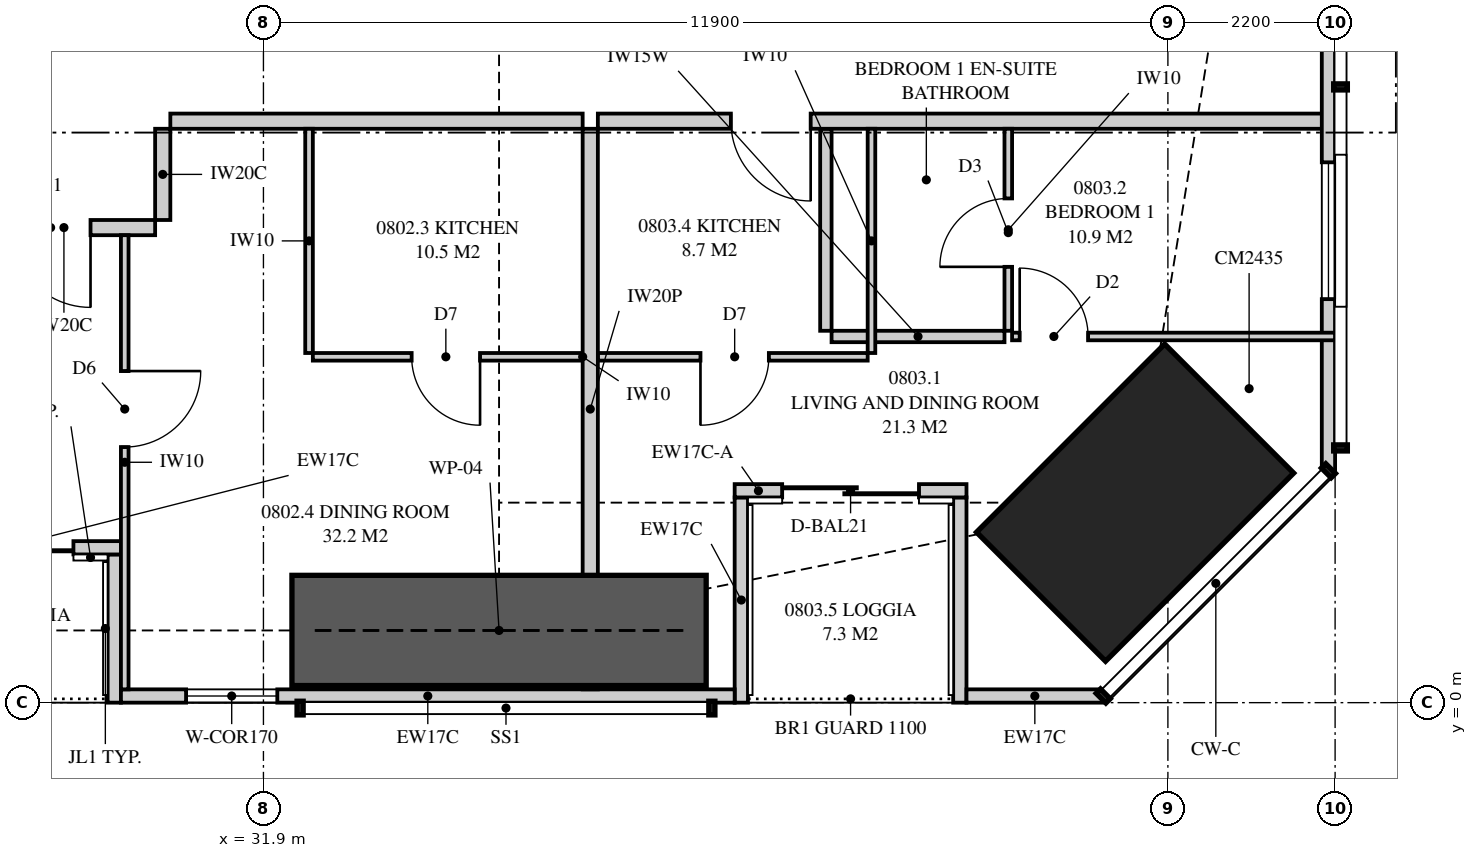
"""IFC4 building model, lengths in metres.
Left out: names, types, materials, properties, quantities, classifications, styles, units other than length and angle.
Written with IfcOpenShell. Run it as: python <this file> out.ifc"""

import sys

from ifc_helpers import new_model, si_unit, direction, frame, frame_2d, origin, origin_2d, place, context, subcontext, project, spatial, polyline, rectangle, outline, extrude, element, fill, save


model = new_model("IFC4")
c1 = context("Model", 3, precision=1e-05, world=origin(), true_north=direction((0.0, 1.0)))
c2 = subcontext(c1, "Body", "Model", "MODEL_VIEW")
j1 = project(units=[si_unit("LENGTHUNIT", "METRE"), si_unit("PLANEANGLEUNIT", "RADIAN")], contexts=[c1])
p1 = place(None, origin())
s1 = spatial("IfcSite", under=j1, at=p1, CompositionType="ELEMENT")
p2 = place(p1, origin())
s2 = spatial("IfcBuilding", under=s1, at=p2, CompositionType="ELEMENT")
p3 = place(p2, frame((0.0, 0.0, 34.4)))
s3 = spatial("IfcBuildingStorey", under=s2, at=p3, CompositionType="ELEMENT", Elevation=34.4)
p4 = place(p3, frame((43.369, 2.631, 0.0), z_axis=(0.0, 0.0, 1.0), x_axis=(-0.707106781187, 0.707106781187, 0.0)))
e1 = element("IfcColumn", 1, at=p4, inside=s3, PredefinedType="COLUMN", context=c2, shape_type="SweptSolid", body=[
    extrude(rectangle(XDim=2.4, YDim=3.5, at=origin_2d()), origin(), (0.0, 0.0, 1.0), 3.35),
])
p5 = place(p3, frame((30.025, 0.087, 0.0), z_axis=(0.0, 0.0, 1.0), x_axis=(1.0, 0.0, 0.0)))
e2 = element("IfcWall", 2, at=p5, inside=s3, PredefinedType="SOLIDWALL", context=c2, shape_type="SweptSolid", body=[
    extrude(outline(polyline([(0.0, 0.0), (8.075, 0.0), (8.075, 3.11), (5.179, 3.11), (5.179, 2.15), (5.131, 2.15), (5.131, 3.11), (4.975, 3.11), (4.975, 2.15), (0.0, 2.15), (0.0, 0.0)])), frame((0.0, 0.087, 0.0), z_axis=(0.0, -1.0, 0.0), x_axis=(1.0, 0.0, 0.0)), (0.0, 0.0, 1.0), 0.175),
])
p6 = place(p5, frame((0.857, 0.0, 0.4)))
e3 = element("IfcOpeningElement", 3, at=p6, cuts=e2, PredefinedType="OPENING", context=c2, shape_type="SweptSolid", body=[
    extrude(rectangle(XDim=1.2, YDim=1.7, at=frame_2d((0.6, 0.85))), frame((0.0, 0.097, 0.0), z_axis=(0.0, -1.0, 0.0), x_axis=(1.0, 0.0, 0.0)), (0.0, 0.0, 1.0), 0.195),
])
p7 = place(p3, frame((41.15, 0.087, 0.0), z_axis=(0.0, 0.0, 1.0), x_axis=(1.0, 0.0, 0.0)))
e4 = element("IfcWall", 4, at=p7, inside=s3, PredefinedType="SOLIDWALL", context=c2, shape_type="SweptSolid", body=[
    extrude(rectangle(XDim=1.799, YDim=0.175, at=frame_2d((0.899, 0.0))), origin(), (0.0, 0.0, 1.0), 3.11),
])
p8 = place(p3, frame((26.975, 2.038, 0.0), z_axis=(0.0, 0.0, 1.0), x_axis=(1.0, 0.0, 0.0)))
e5 = element("IfcWall", 5, at=p8, inside=s3, PredefinedType="SOLIDWALL", context=c2, shape_type="SweptSolid", body=[
    extrude(rectangle(XDim=3.05, YDim=0.175, at=frame_2d((1.525, 0.0))), origin(), (0.0, 0.0, 1.0), 3.11),
])
p9 = place(p8, frame((0.625, 0.0, 0.0)))
e6 = element("IfcOpeningElement", 6, at=p9, cuts=e5, PredefinedType="OPENING", context=c2, shape_type="SweptSolid", body=[
    extrude(rectangle(XDim=1.8, YDim=2.1, at=frame_2d((0.9, 1.05))), frame((0.0, 0.097, 0.0), z_axis=(0.0, -1.0, 0.0), x_axis=(1.0, 0.0, 0.0)), (0.0, 0.0, 1.0), 0.195),
])
p10 = place(p3, frame((29.938, 0.0, 0.0), z_axis=(0.0, 0.0, 1.0), x_axis=(0.0, 1.0, 0.0)))
e7 = element("IfcWall", 7, at=p10, inside=s3, PredefinedType="SOLIDWALL", context=c2, shape_type="SweptSolid", body=[
    extrude(outline(polyline([(0.0, 0.0), (1.95, 0.0), (1.95, 3.11), (1.75, 3.11), (1.75, 2.15), (0.15, 2.15), (0.15, 3.11), (0.0, 3.11), (0.0, 0.0)])), frame((0.0, 0.087, 0.0), z_axis=(0.0, -1.0, 0.0), x_axis=(1.0, 0.0, 0.0)), (0.0, 0.0, 1.0), 0.175),
])
p11 = place(p3, frame((38.1, 2.788, 0.0), z_axis=(0.0, 0.0, 1.0), x_axis=(1.0, 0.0, 0.0)))
e8 = element("IfcWall", 8, at=p11, inside=s3, PredefinedType="SOLIDWALL", context=c2, shape_type="SweptSolid", body=[
    extrude(rectangle(XDim=0.625, YDim=0.175, at=frame_2d((0.312, 0.0))), origin(), (0.0, 0.0, 1.0), 2.51),
])
p12 = place(p3, frame((38.725, 2.788, 0.0), z_axis=(0.0, 0.0, 1.0), x_axis=(1.0, 0.0, 0.0)))
e9 = element("IfcWall", 9, at=p12, inside=s3, PredefinedType="SOLIDWALL", context=c2, shape_type="SweptSolid", body=[
    extrude(rectangle(XDim=2.425, YDim=0.175, at=frame_2d((1.212, 0.0))), origin(), (0.0, 0.0, 1.0), 2.15),
])
p13 = place(p12, origin())
e10 = element("IfcOpeningElement", 10, at=p13, cuts=e9, PredefinedType="OPENING", context=c2, shape_type="SweptSolid", body=[
    extrude(rectangle(XDim=1.8, YDim=2.1, at=frame_2d((0.9, 1.05))), frame((0.0, 0.097, 0.0), z_axis=(0.0, -1.0, 0.0), x_axis=(1.0, 0.0, 0.0)), (0.0, 0.0, 1.0), 0.195),
])
p14 = place(p3, frame((38.188, 0.0, 0.0), z_axis=(0.0, 0.0, 1.0), x_axis=(0.0, 1.0, 0.0)))
e11 = element("IfcWall", 11, at=p14, inside=s3, PredefinedType="SOLIDWALL", context=c2, shape_type="SweptSolid", body=[
    extrude(outline(polyline([(0.0, 0.0), (2.7, 0.0), (2.7, 2.51), (2.424, 2.51), (2.424, 2.15), (0.757, 2.15), (0.757, 3.11), (0.0, 3.11), (0.0, 0.0)])), frame((0.0, 0.087, 0.0), z_axis=(0.0, -1.0, 0.0), x_axis=(1.0, 0.0, 0.0)), (0.0, 0.0, 1.0), 0.175),
])
p15 = place(p3, frame((41.062, 0.0, 0.0), z_axis=(0.0, 0.0, 1.0), x_axis=(0.0, 1.0, 0.0)))
e12 = element("IfcWall", 12, at=p15, inside=s3, PredefinedType="SOLIDWALL", context=c2, shape_type="SweptSolid", body=[
    extrude(outline(polyline([(0.0, 0.0), (2.7, 0.0), (2.7, 2.15), (1.334, 2.15), (1.334, 3.11), (0.0, 3.11), (0.0, 0.0)])), frame((0.0, 0.087, 0.0), z_axis=(0.0, -1.0, 0.0), x_axis=(1.0, 0.0, 0.0)), (0.0, 0.0, 1.0), 0.175),
])
p16 = place(p3, frame((45.913, 3.051, 0.0), z_axis=(0.0, 0.0, 1.0), x_axis=(0.0, 1.0, 0.0)))
e13 = element("IfcWall", 13, at=p16, inside=s3, PredefinedType="SOLIDWALL", context=c2, shape_type="SweptSolid", body=[
    extrude(outline(polyline([(0.0, 0.0), (31.897, 0.0), (31.897, 3.11), (22.167, 3.11), (22.167, 2.15), (22.074, 2.15), (22.074, 3.11), (21.949, 3.11), (21.949, 2.15), (9.949, 2.15), (9.949, 3.11), (9.823, 3.11), (9.823, 2.15), (9.73, 2.15), (9.73, 3.11), (0.0, 3.11), (0.0, 0.0)])), frame((0.0, 0.087, 0.0), z_axis=(0.0, -1.0, 0.0), x_axis=(1.0, 0.0, 0.0)), (0.0, 0.0, 1.0), 0.175),
])
p17 = place(p16, frame((2.257, 0.0, 0.4)))
e14 = element("IfcOpeningElement", 14, at=p17, cuts=e13, PredefinedType="OPENING", context=c2, shape_type="SweptSolid", body=[
    extrude(rectangle(XDim=1.8, YDim=1.7, at=frame_2d((0.9, 0.85))), frame((0.0, 0.097, 0.0), z_axis=(0.0, -1.0, 0.0), x_axis=(1.0, 0.0, 0.0)), (0.0, 0.0, 1.0), 0.195),
])
p18 = place(p16, frame((14.849, 0.0, 0.4)))
e15 = element("IfcOpeningElement", 15, at=p18, cuts=e13, PredefinedType="OPENING", context=c2, shape_type="SweptSolid", body=[
    extrude(rectangle(XDim=1.2, YDim=1.7, at=frame_2d((0.6, 0.85))), frame((0.0, 0.097, 0.0), z_axis=(0.0, -1.0, 0.0), x_axis=(1.0, 0.0, 0.0)), (0.0, 0.0, 1.0), 0.195),
])
p19 = place(p16, frame((27.34, 0.0, 0.4)))
e16 = element("IfcOpeningElement", 16, at=p19, cuts=e13, PredefinedType="OPENING", context=c2, shape_type="SweptSolid", body=[
    extrude(rectangle(XDim=1.8, YDim=1.7, at=frame_2d((0.9, 0.85))), frame((0.0, 0.097, 0.0), z_axis=(0.0, -1.0, 0.0), x_axis=(1.0, 0.0, 0.0)), (0.0, 0.0, 1.0), 0.195),
])
p20 = place(p3, frame((36.2, 0.175, 0.0), z_axis=(0.0, 0.0, 1.0), x_axis=(0.0, 1.0, 0.0)))
e17 = element("IfcWall", 17, at=p20, inside=s3, PredefinedType="PARTITIONING", context=c2, shape_type="SweptSolid", body=[
    extrude(outline(polyline([(0.088, 3.11), (0.0, 3.11), (0.0, 0.0), (0.529, 0.0), (0.529, 0.677), (1.021, 0.677), (1.021, 0.0), (7.375, 0.0), (7.375, 3.11), (3.766, 3.11), (3.766, 2.51), (1.944, 2.51), (1.944, 2.15), (1.021, 2.15), (1.021, 1.473), (0.529, 1.473), (0.529, 2.15), (0.088, 2.15), (0.088, 3.11)])), frame((0.0, 0.1, 0.0), z_axis=(0.0, -1.0, 0.0), x_axis=(1.0, 0.0, 0.0)), (0.0, 0.0, 1.0), 0.2),
])
p21 = place(p3, frame((32.55, 4.55, 0.0), z_axis=(0.0, 0.0, 1.0), x_axis=(1.0, 0.0, 0.0)))
e18 = element("IfcWall", 18, at=p21, inside=s3, PredefinedType="PARTITIONING", context=c2, shape_type="SweptSolid", body=[
    extrude(outline(polyline([(0.0, 0.0), (3.55, 0.0), (3.55, 3.11), (2.737, 3.11), (2.737, 2.541), (2.163, 2.541), (2.163, 3.11), (0.0, 3.11), (0.0, 0.0)])), frame((0.0, 0.05, 0.0), z_axis=(0.0, -1.0, 0.0), x_axis=(1.0, 0.0, 0.0)), (0.0, 0.0, 1.0), 0.1),
])
p22 = place(p21, frame((1.3, 0.0, 0.0)))
e19 = element("IfcOpeningElement", 19, at=p22, cuts=e18, PredefinedType="OPENING", context=c2, shape_type="SweptSolid", body=[
    extrude(rectangle(XDim=0.9, YDim=2.1, at=frame_2d((0.45, 1.05))), frame((0.0, 0.06, 0.0), z_axis=(0.0, -1.0, 0.0), x_axis=(1.0, 0.0, 0.0)), (0.0, 0.0, 1.0), 0.12),
])
p23 = place(p3, frame((32.5, 4.6, 0.0), z_axis=(0.0, 0.0, 1.0), x_axis=(0.0, 1.0, 0.0)))
e20 = element("IfcWall", 20, at=p23, inside=s3, PredefinedType="PARTITIONING", context=c2, shape_type="SweptSolid", body=[
    extrude(rectangle(XDim=2.95, YDim=0.1, at=frame_2d((1.475, 0.0))), origin(), (0.0, 0.0, 1.0), 3.11),
])
p24 = place(p3, frame((30.075, 0.175, 0.0), z_axis=(0.0, 0.0, 1.0), x_axis=(0.0, 1.0, 0.0)))
e21 = element("IfcWall", 21, at=p24, inside=s3, PredefinedType="PARTITIONING", context=c2, shape_type="SweptSolid", body=[
    extrude(outline(polyline([(0.0, 0.0), (5.975, 0.0), (5.975, 3.11), (1.635, 3.11), (1.635, 2.15), (0.0, 2.15), (0.0, 3.11), (0.0, 0.0)])), frame((0.0, 0.05, 0.0), z_axis=(0.0, -1.0, 0.0), x_axis=(1.0, 0.0, 0.0)), (0.0, 0.0, 1.0), 0.1),
])
p25 = place(p24, frame((3.188, 0.0, 0.0)))
e22 = element("IfcOpeningElement", 22, at=p25, cuts=e21, PredefinedType="OPENING", context=c2, shape_type="SweptSolid", body=[
    extrude(rectangle(XDim=1.0, YDim=2.1, at=frame_2d((0.5, 1.05))), frame((0.0, 0.06, 0.0), z_axis=(0.0, -1.0, 0.0), x_axis=(1.0, 0.0, 0.0)), (0.0, 0.0, 1.0), 0.12),
])
p26 = place(p3, frame((36.3, 7.65, 0.0), z_axis=(0.0, 0.0, 1.0), x_axis=(1.0, 0.0, 0.0)))
e23 = element("IfcWall", 23, at=p26, inside=s3, PredefinedType="PARTITIONING", context=c2, shape_type="SweptSolid", body=[
    extrude(outline(polyline([(0.0, 0.0), (9.7, 0.0), (9.7, 3.11), (8.804, 3.11), (8.804, 2.15), (6.96, 2.15), (6.96, 3.11), (0.0, 3.11), (0.0, 0.0)])), frame((0.0, 0.1, 0.0), z_axis=(0.0, -1.0, 0.0), x_axis=(1.0, 0.0, 0.0)), (0.0, 0.0, 1.0), 0.2),
])
p27 = place(p26, frame((1.75, 0.0, 0.0)))
e24 = element("IfcOpeningElement", 24, at=p27, cuts=e23, PredefinedType="OPENING", context=c2, shape_type="SweptSolid", body=[
    extrude(rectangle(XDim=1.05, YDim=2.2, at=frame_2d((0.525, 1.1))), frame((0.0, 0.11, 0.0), z_axis=(0.0, -1.0, 0.0), x_axis=(1.0, 0.0, 0.0)), (0.0, 0.0, 1.0), 0.22),
])
p28 = place(p3, frame((41.7, 4.892, 0.0), z_axis=(0.0, 0.0, 1.0), x_axis=(0.0, 1.0, 0.0)))
e25 = element("IfcWall", 25, at=p28, inside=s3, PredefinedType="PARTITIONING", context=c2, shape_type="SweptSolid", body=[
    extrude(rectangle(XDim=2.658, YDim=0.1, at=frame_2d((1.329, 0.0))), origin(), (0.0, 0.0, 1.0), 3.11),
])
p29 = place(p28, frame((0.841, 0.0, 0.0)))
e26 = element("IfcOpeningElement", 26, at=p29, cuts=e25, PredefinedType="OPENING", context=c2, shape_type="SweptSolid", body=[
    extrude(rectangle(XDim=0.9, YDim=2.1, at=frame_2d((0.45, 1.05))), frame((0.0, 0.06, 0.0), z_axis=(0.0, -1.0, 0.0), x_axis=(1.0, 0.0, 0.0)), (0.0, 0.0, 1.0), 0.12),
])
p30 = place(p3, frame((41.75, 4.817, 0.0), z_axis=(0.0, 0.0, 1.0), x_axis=(1.0, 0.0, 0.0)))
e27 = element("IfcWall", 27, at=p30, inside=s3, PredefinedType="PARTITIONING", context=c2, shape_type="SweptSolid", body=[
    extrude(outline(polyline([(0.0, 0.0), (4.25, 0.0), (4.25, 3.11), (2.844, 3.11), (2.844, 2.15), (1.102, 2.15), (1.102, 3.11), (0.0, 3.11), (0.0, 0.0)])), frame((0.0, 0.05, 0.0), z_axis=(0.0, -1.0, 0.0), x_axis=(1.0, 0.0, 0.0)), (0.0, 0.0, 1.0), 0.1),
])
p31 = place(p30, frame((0.1, 0.0, 0.0)))
e28 = element("IfcOpeningElement", 28, at=p31, cuts=e27, PredefinedType="OPENING", context=c2, shape_type="SweptSolid", body=[
    extrude(rectangle(XDim=0.9, YDim=2.1, at=frame_2d((0.45, 1.05))), frame((0.0, 0.06, 0.0), z_axis=(0.0, -1.0, 0.0), x_axis=(1.0, 0.0, 0.0)), (0.0, 0.0, 1.0), 0.12),
])
p32 = place(p3, frame((39.375, 4.817, 0.0), z_axis=(0.0, 0.0, 1.0), x_axis=(1.0, 0.0, 0.0)))
e29 = element("IfcWall", 29, at=p32, inside=s3, PredefinedType="PLUMBINGWALL", context=c2, shape_type="SweptSolid", body=[
    extrude(rectangle(XDim=2.275, YDim=0.15, at=frame_2d((1.137, 0.0))), origin(), (0.0, 0.0, 1.0), 3.11),
])
p33 = place(p3, frame((39.3, 4.892, 0.0), z_axis=(0.0, 0.0, 1.0), x_axis=(0.0, 1.0, 0.0)))
e30 = element("IfcWall", 30, at=p33, inside=s3, PredefinedType="PLUMBINGWALL", context=c2, shape_type="SweptSolid", body=[
    extrude(rectangle(XDim=2.658, YDim=0.15, at=frame_2d((1.329, 0.0))), origin(), (0.0, 0.0, 1.0), 3.11),
])
p34 = place(p3, frame((36.3, 4.55, 0.0), z_axis=(0.0, 0.0, 1.0), x_axis=(1.0, 0.0, 0.0)))
e31 = element("IfcWall", 31, at=p34, inside=s3, PredefinedType="PARTITIONING", context=c2, shape_type="SweptSolid", body=[
    extrude(rectangle(XDim=3.55, YDim=0.1, at=frame_2d((1.775, 0.0))), origin(), (0.0, 0.0, 1.0), 3.11),
])
p35 = place(p34, frame((1.35, 0.0, 0.0)))
e32 = element("IfcOpeningElement", 32, at=p35, cuts=e31, PredefinedType="OPENING", context=c2, shape_type="SweptSolid", body=[
    extrude(rectangle(XDim=0.9, YDim=2.1, at=frame_2d((0.45, 1.05))), frame((0.0, 0.06, 0.0), z_axis=(0.0, -1.0, 0.0), x_axis=(1.0, 0.0, 0.0)), (0.0, 0.0, 1.0), 0.12),
])
p36 = place(p3, frame((39.9, 4.6, 0.0), z_axis=(0.0, 0.0, 1.0), x_axis=(0.0, 1.0, 0.0)))
e33 = element("IfcWall", 33, at=p36, inside=s3, PredefinedType="PARTITIONING", context=c2, shape_type="SweptSolid", body=[
    extrude(rectangle(XDim=2.95, YDim=0.1, at=frame_2d((1.475, 0.0))), origin(), (0.0, 0.0, 1.0), 3.11),
])
p37 = place(p3, frame((30.675, 7.65, 0.0), z_axis=(0.0, 0.0, 1.0), x_axis=(1.0, 0.0, 0.0)))
e34 = element("IfcWall", 34, at=p37, inside=s3, PredefinedType="PARTITIONING", context=c2, shape_type="SweptSolid", body=[
    extrude(outline(polyline([(0.0, 0.0), (5.425, 0.0), (5.425, 3.11), (4.662, 3.11), (4.662, 2.541), (3.988, 2.541), (3.988, 3.11), (0.0, 3.11), (0.0, 0.0)])), frame((0.0, 0.1, 0.0), z_axis=(0.0, -1.0, 0.0), x_axis=(1.0, 0.0, 0.0)), (0.0, 0.0, 1.0), 0.2),
])
p38 = place(p3, frame((28.075, 6.25, 0.0), z_axis=(0.0, 0.0, 1.0), x_axis=(1.0, 0.0, 0.0)))
e35 = element("IfcWall", 35, at=p38, inside=s3, PredefinedType="PARTITIONING", context=c2, shape_type="SweptSolid", body=[
    extrude(rectangle(XDim=2.4, YDim=0.2, at=frame_2d((1.2, 0.0))), origin(), (0.0, 0.0, 1.0), 3.11),
])
p39 = place(p38, frame((0.5, 0.0, 0.0)))
e36 = element("IfcOpeningElement", 36, at=p39, cuts=e35, PredefinedType="OPENING", context=c2, shape_type="SweptSolid", body=[
    extrude(rectangle(XDim=1.05, YDim=2.2, at=frame_2d((0.525, 1.1))), frame((0.0, 0.11, 0.0), z_axis=(0.0, -1.0, 0.0), x_axis=(1.0, 0.0, 0.0)), (0.0, 0.0, 1.0), 0.22),
])
p40 = place(p3, frame((30.575, 7.55, 0.0), z_axis=(0.0, 0.0, 1.0), x_axis=(0.0, -1.0, 0.0)))
e37 = element("IfcWall", 37, at=p40, inside=s3, PredefinedType="PARTITIONING", context=c2, shape_type="SweptSolid", body=[
    extrude(rectangle(XDim=1.2, YDim=0.2, at=frame_2d((0.6, 0.0))), origin(), (0.0, 0.0, 1.0), 3.11),
])
p41 = place(p3, frame((32.275, 0.95, 0.0), z_axis=(0.0, 0.0, 1.0), x_axis=(1.0, 0.0, 0.0)))
e38 = element("IfcWall", 38, at=p41, inside=s3, PredefinedType="SHEAR", context=c2, shape_type="SweptSolid", body=[
    extrude(rectangle(XDim=5.45, YDim=1.45, at=frame_2d((2.725, 0.0))), origin(), (0.0, 0.0, 1.0), 3.35),
])
p42 = place(p9, origin())
e39 = element("IfcDoor", 39, at=p42, inside=s3, OperationType="SLIDING_TO_LEFT", PredefinedType="DOOR", context=c2, shape_type="SweptSolid", body=[
    extrude(rectangle(XDim=1.8, YDim=2.1, at=frame_2d((0.9, 1.05))), frame((0.0, 0.025, 0.0), z_axis=(0.0, -1.0, 0.0), x_axis=(1.0, 0.0, 0.0)), (0.0, 0.0, 1.0), 0.05),
])
fill(e6, e39)
p43 = place(p6, origin())
e40 = element("IfcWindow", 40, at=p43, inside=s3, PartitioningType="SINGLE_PANEL", PredefinedType="WINDOW", context=c2, shape_type="SweptSolid", body=[
    extrude(rectangle(XDim=1.2, YDim=1.7, at=frame_2d((0.6, 0.85))), frame((0.0, 0.03, 0.0), z_axis=(0.0, -1.0, 0.0), x_axis=(1.0, 0.0, 0.0)), (0.0, 0.0, 1.0), 0.06),
])
fill(e3, e40)
p44 = place(p13, origin())
e41 = element("IfcDoor", 41, at=p44, inside=s3, OperationType="SLIDING_TO_LEFT", PredefinedType="DOOR", context=c2, shape_type="SweptSolid", body=[
    extrude(rectangle(XDim=1.8, YDim=2.1, at=frame_2d((0.9, 1.05))), frame((0.0, 0.025, 0.0), z_axis=(0.0, -1.0, 0.0), x_axis=(1.0, 0.0, 0.0)), (0.0, 0.0, 1.0), 0.05),
])
fill(e10, e41)
p45 = place(p17, origin())
e42 = element("IfcWindow", 42, at=p45, inside=s3, PartitioningType="SINGLE_PANEL", PredefinedType="WINDOW", context=c2, shape_type="SweptSolid", body=[
    extrude(rectangle(XDim=1.8, YDim=1.7, at=frame_2d((0.9, 0.85))), frame((0.0, 0.03, 0.0), z_axis=(0.0, -1.0, 0.0), x_axis=(1.0, 0.0, 0.0)), (0.0, 0.0, 1.0), 0.06),
])
fill(e14, e42)
p46 = place(p39, frame((1.05, 0.0, 0.0), z_axis=(0.0, 0.0, 1.0), x_axis=(-1.0, 0.0, 0.0)))
e43 = element("IfcDoor", 43, at=p46, inside=s3, OperationType="SINGLE_SWING_LEFT", PredefinedType="DOOR", context=c2, shape_type="SweptSolid", body=[
    extrude(rectangle(XDim=1.05, YDim=2.2, at=frame_2d((0.525, 1.1))), frame((0.0, 0.025, 0.0), z_axis=(0.0, -1.0, 0.0), x_axis=(1.0, 0.0, 0.0)), (0.0, 0.0, 1.0), 0.05),
])
fill(e36, e43)
p47 = place(p22, frame((0.9, 0.0, 0.0), z_axis=(0.0, 0.0, 1.0), x_axis=(-1.0, 0.0, 0.0)))
e44 = element("IfcDoor", 44, at=p47, inside=s3, OperationType="SINGLE_SWING_LEFT", PredefinedType="DOOR", context=c2, shape_type="SweptSolid", body=[
    extrude(rectangle(XDim=0.9, YDim=2.1, at=frame_2d((0.45, 1.05))), frame((0.0, 0.025, 0.0), z_axis=(0.0, -1.0, 0.0), x_axis=(1.0, 0.0, 0.0)), (0.0, 0.0, 1.0), 0.05),
])
fill(e19, e44)
p48 = place(p25, frame((1.0, 0.0, 0.0), z_axis=(0.0, 0.0, 1.0), x_axis=(-1.0, 0.0, 0.0)))
e45 = element("IfcDoor", 45, at=p48, inside=s3, OperationType="SINGLE_SWING_LEFT", PredefinedType="DOOR", context=c2, shape_type="SweptSolid", body=[
    extrude(rectangle(XDim=1.0, YDim=2.1, at=frame_2d((0.5, 1.05))), frame((0.0, 0.025, 0.0), z_axis=(0.0, -1.0, 0.0), x_axis=(1.0, 0.0, 0.0)), (0.0, 0.0, 1.0), 0.05),
])
fill(e22, e45)
p49 = place(p27, frame((1.05, 0.0, 0.0), z_axis=(0.0, 0.0, 1.0), x_axis=(-1.0, 0.0, 0.0)))
e46 = element("IfcDoor", 46, at=p49, inside=s3, OperationType="SINGLE_SWING_LEFT", PredefinedType="DOOR", context=c2, shape_type="SweptSolid", body=[
    extrude(rectangle(XDim=1.05, YDim=2.2, at=frame_2d((0.525, 1.1))), frame((0.0, 0.025, 0.0), z_axis=(0.0, -1.0, 0.0), x_axis=(1.0, 0.0, 0.0)), (0.0, 0.0, 1.0), 0.05),
])
fill(e24, e46)
p50 = place(p31, origin())
e47 = element("IfcDoor", 47, at=p50, inside=s3, OperationType="SINGLE_SWING_LEFT", PredefinedType="DOOR", context=c2, shape_type="SweptSolid", body=[
    extrude(rectangle(XDim=0.9, YDim=2.1, at=frame_2d((0.45, 1.05))), frame((0.0, 0.025, 0.0), z_axis=(0.0, -1.0, 0.0), x_axis=(1.0, 0.0, 0.0)), (0.0, 0.0, 1.0), 0.05),
])
fill(e28, e47)
p51 = place(p29, origin())
e48 = element("IfcDoor", 48, at=p51, inside=s3, OperationType="SINGLE_SWING_LEFT", PredefinedType="DOOR", context=c2, shape_type="SweptSolid", body=[
    extrude(rectangle(XDim=0.9, YDim=2.1, at=frame_2d((0.45, 1.05))), frame((0.0, 0.025, 0.0), z_axis=(0.0, -1.0, 0.0), x_axis=(1.0, 0.0, 0.0)), (0.0, 0.0, 1.0), 0.05),
])
fill(e26, e48)
p52 = place(p35, frame((0.9, 0.0, 0.0), z_axis=(0.0, 0.0, 1.0), x_axis=(-1.0, 0.0, 0.0)))
e49 = element("IfcDoor", 49, at=p52, inside=s3, OperationType="SINGLE_SWING_RIGHT", PredefinedType="DOOR", context=c2, shape_type="SweptSolid", body=[
    extrude(rectangle(XDim=0.9, YDim=2.1, at=frame_2d((0.45, 1.05))), frame((0.0, 0.025, 0.0), z_axis=(0.0, -1.0, 0.0), x_axis=(1.0, 0.0, 0.0)), (0.0, 0.0, 1.0), 0.05),
])
fill(e32, e49)
save(model, sys.argv[1])
